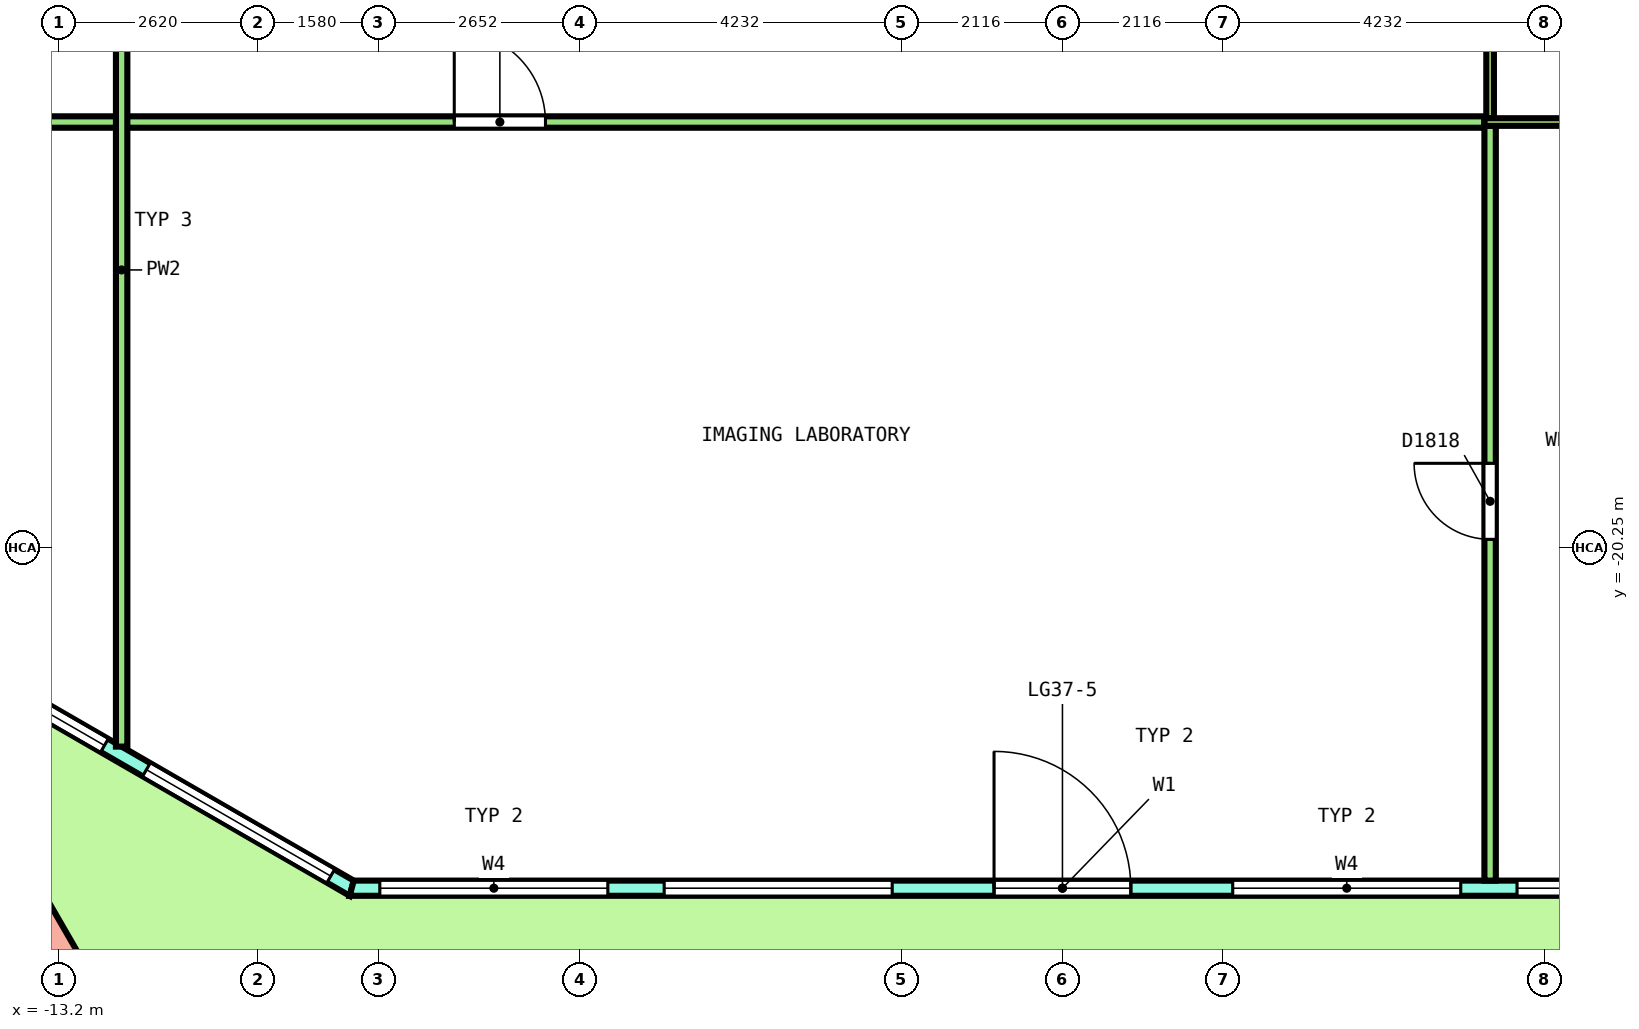
"""IFC4 building model, lengths in metres.
Left out: names, types, materials, properties, quantities, classifications, styles, units other than length and angle.
Written with IfcOpenShell. Run it as: python <this file> out.ifc"""

import sys

from ifc_helpers import new_model, si_unit, direction, frame, frame_2d, origin, origin_2d, place, context, subcontext, project, spatial, polyline, rectangle, outline, extrude, element, fill, save


model = new_model("IFC4")
c1 = context("Model", 3, precision=1e-05, world=origin(), true_north=direction((0.0, 1.0)))
c2 = subcontext(c1, "Body", "Model", "MODEL_VIEW")
j1 = project(units=[si_unit("LENGTHUNIT", "METRE"), si_unit("PLANEANGLEUNIT", "RADIAN")], contexts=[c1])
p1 = place(None, origin())
s1 = spatial("IfcSite", under=j1, at=p1, CompositionType="ELEMENT")
p2 = place(p1, origin())
s2 = spatial("IfcBuilding", under=s1, at=p2, CompositionType="ELEMENT")
p3 = place(p2, frame((0.0, 0.0, 171.6)))
s3 = spatial("IfcBuildingStorey", under=s2, at=p3, CompositionType="ELEMENT", Elevation=171.6)
p4 = place(p3, frame((-13.727, -25.436, 0.0), z_axis=(0.018133721723, -0.031387604711, 0.999342777233), x_axis=(0.86599921333, -0.499059227482, -0.031388691869)))
e1 = element("IfcColumn", 1, at=p4, inside=s3, PredefinedType="COLUMN", context=c2, shape_type="SweptSolid", body=[
    extrude(rectangle(XDim=1.2, YDim=1.2, at=origin_2d()), origin(), (0.0, 0.0, 1.0), 4.052),
])
p5 = place(p3, frame((-15.304, -21.292, 0.0), z_axis=(0.0, 0.0, 1.0), x_axis=(0.866014080581, -0.50001961185, 0.0)))
e2 = element("IfcWall", 2, at=p5, inside=s3, PredefinedType="SOLIDWALL", context=c2, shape_type="SweptSolid", body=[
    extrude(outline(polyline([(-0.027, -0.1), (1.128, -0.1), (2.283, -0.1), (3.438, -0.1), (4.592, -0.1), (5.747, -0.1), (6.902, -0.1), (6.848, 0.1), (5.711, 0.1), (4.574, 0.1), (3.438, 0.1), (2.301, 0.1), (1.164, 0.1), (0.027, 0.1), (-0.027, -0.1)])), origin(), (0.0, 0.0, 1.0), 4.1),
])
p6 = place(p5, frame((0.319, 0.0, 0.1)))
e3 = element("IfcOpeningElement", 3, at=p6, cuts=e2, PredefinedType="OPENING", context=c2, shape_type="SweptSolid", body=[
    extrude(rectangle(XDim=2.8, YDim=2.9, at=frame_2d((1.4, 1.45))), frame((0.0, 0.11, 0.0), z_axis=(0.0, -1.0, 0.0), x_axis=(1.0, 0.0, 0.0)), (0.0, 0.0, 1.0), 0.22),
])
p7 = place(p5, frame((3.756, 0.0, 0.1)))
e4 = element("IfcOpeningElement", 4, at=p7, cuts=e2, PredefinedType="OPENING", context=c2, shape_type="SweptSolid", body=[
    extrude(rectangle(XDim=2.8, YDim=2.9, at=frame_2d((1.4, 1.45))), frame((0.0, 0.11, 0.0), z_axis=(0.0, -1.0, 0.0), x_axis=(1.0, 0.0, 0.0)), (0.0, 0.0, 1.0), 0.22),
])
p8 = place(p3, frame((-9.351, -24.73, 0.0), z_axis=(0.0, 0.0, 1.0), x_axis=(1.0, 0.0, 0.0)))
e5 = element("IfcWall", 5, at=p8, inside=s3, PredefinedType="SOLIDWALL", context=c2, shape_type="SweptSolid", body=[
    extrude(outline(polyline([(-0.027, -0.1), (1.015, -0.1), (2.057, -0.1), (3.099, -0.1), (4.141, -0.1), (5.183, -0.1), (6.225, -0.1), (7.267, -0.1), (8.309, -0.1), (9.351, -0.1), (10.393, -0.1), (11.435, -0.1), (12.476, -0.1), (13.518, -0.1), (14.56, -0.1), (15.602, -0.1), (16.644, -0.1), (17.686, -0.1), (18.728, -0.1), (18.674, 0.1), (17.638, 0.1), (16.602, 0.1), (15.566, 0.1), (14.531, 0.1), (13.494, 0.1), (12.458, 0.1), (11.423, 0.1), (10.386, 0.1), (9.351, 0.1), (8.315, 0.1), (7.279, 0.1), (6.243, 0.1), (5.207, 0.1), (4.171, 0.1), (3.135, 0.1), (2.099, 0.1), (1.063, 0.1), (0.027, 0.1), (-0.027, -0.1)])), origin(), (0.0, 0.0, 1.0), 4.1),
])
p9 = place(p8, frame((0.37, 0.0, 0.1)))
e6 = element("IfcOpeningElement", 6, at=p9, cuts=e5, PredefinedType="OPENING", context=c2, shape_type="SweptSolid", body=[
    extrude(rectangle(XDim=3.0, YDim=2.9, at=frame_2d((1.5, 1.45))), frame((0.0, 0.11, 0.0), z_axis=(0.0, -1.0, 0.0), x_axis=(1.0, 0.0, 0.0)), (0.0, 0.0, 1.0), 0.22),
])
p10 = place(p8, frame((4.11, 0.0, 0.1)))
e7 = element("IfcOpeningElement", 7, at=p10, cuts=e5, PredefinedType="OPENING", context=c2, shape_type="SweptSolid", body=[
    extrude(rectangle(XDim=3.0, YDim=2.9, at=frame_2d((1.5, 1.45))), frame((0.0, 0.11, 0.0), z_axis=(0.0, -1.0, 0.0), x_axis=(1.0, 0.0, 0.0)), (0.0, 0.0, 1.0), 0.22),
])
p11 = place(p8, frame((8.451, 0.0, 0.0)))
e8 = element("IfcOpeningElement", 8, at=p11, cuts=e5, PredefinedType="OPENING", context=c2, shape_type="SweptSolid", body=[
    extrude(rectangle(XDim=1.8, YDim=2.4, at=frame_2d((0.9, 1.2))), frame((0.0, 0.11, 0.0), z_axis=(0.0, -1.0, 0.0), x_axis=(1.0, 0.0, 0.0)), (0.0, 0.0, 1.0), 0.22),
])
p12 = place(p8, frame((8.451, 0.0, 2.55)))
e9 = element("IfcOpeningElement", 9, at=p12, cuts=e5, PredefinedType="OPENING", context=c2, shape_type="SweptSolid", body=[
    extrude(rectangle(XDim=1.8, YDim=0.45, at=frame_2d((0.9, 0.225))), frame((0.0, 0.11, 0.0), z_axis=(0.0, -1.0, 0.0), x_axis=(1.0, 0.0, 0.0)), (0.0, 0.0, 1.0), 0.22),
])
p13 = place(p8, frame((11.591, 0.0, 0.1)))
e10 = element("IfcOpeningElement", 10, at=p13, cuts=e5, PredefinedType="OPENING", context=c2, shape_type="SweptSolid", body=[
    extrude(rectangle(XDim=3.0, YDim=2.9, at=frame_2d((1.5, 1.45))), frame((0.0, 0.11, 0.0), z_axis=(0.0, -1.0, 0.0), x_axis=(1.0, 0.0, 0.0)), (0.0, 0.0, 1.0), 0.22),
])
p14 = place(p8, frame((15.331, 0.0, 0.1)))
e11 = element("IfcOpeningElement", 11, at=p14, cuts=e5, PredefinedType="OPENING", context=c2, shape_type="SweptSolid", body=[
    extrude(rectangle(XDim=3.0, YDim=2.9, at=frame_2d((1.5, 1.45))), frame((0.0, 0.11, 0.0), z_axis=(0.0, -1.0, 0.0), x_axis=(1.0, 0.0, 0.0)), (0.0, 0.0, 1.0), 0.22),
])
p15 = place(p3, frame((-19.024, -14.65, 0.0), z_axis=(0.0, 0.0, 1.0), x_axis=(1.0, 0.0, 0.0)))
e12 = element("IfcWall", 12, at=p15, inside=s3, PredefinedType="PARTITIONING", context=c2, shape_type="SweptSolid", body=[
    extrude(rectangle(XDim=24.575, YDim=0.15, at=frame_2d((12.288, 0.0))), origin(), (0.0, 0.0, 1.0), 3.05),
])
p16 = place(p15, frame((2.823, 0.0, 0.0)))
e13 = element("IfcOpeningElement", 13, at=p16, cuts=e12, PredefinedType="OPENING", context=c2, shape_type="SweptSolid", body=[
    extrude(rectangle(XDim=1.0, YDim=2.1, at=frame_2d((0.5, 1.05))), frame((0.0, 0.085, 0.0), z_axis=(0.0, -1.0, 0.0), x_axis=(1.0, 0.0, 0.0)), (0.0, 0.0, 1.0), 0.17),
])
p17 = place(p15, frame((11.022, 0.0, 0.0)))
e14 = element("IfcOpeningElement", 14, at=p17, cuts=e12, PredefinedType="OPENING", context=c2, shape_type="SweptSolid", body=[
    extrude(rectangle(XDim=1.2, YDim=2.1, at=frame_2d((0.6, 1.05))), frame((0.0, 0.085, 0.0), z_axis=(0.0, -1.0, 0.0), x_axis=(1.0, 0.0, 0.0)), (0.0, 0.0, 1.0), 0.17),
])
p18 = place(p3, frame((-12.377, -22.867, 0.0), z_axis=(0.0, 0.0, 1.0), x_axis=(0.0, 1.0, 0.0)))
e15 = element("IfcWall", 15, at=p18, inside=s3, PredefinedType="PARTITIONING", context=c2, shape_type="SweptSolid", body=[
    extrude(rectangle(XDim=12.542, YDim=0.15, at=frame_2d((6.271, 0.0))), origin(), (0.0, 0.0, 1.0), 3.05),
])
p19 = place(p3, frame((5.626, -24.63, 0.0), z_axis=(0.0, 0.0, 1.0), x_axis=(0.0, 1.0, 0.0)))
e16 = element("IfcWall", 16, at=p19, inside=s3, PredefinedType="PARTITIONING", context=c2, shape_type="SweptSolid", body=[
    extrude(rectangle(XDim=9.93, YDim=0.15, at=frame_2d((4.965, 0.0))), origin(), (0.0, 0.0, 1.0), 3.05),
])
p20 = place(p19, frame((4.49, 0.0, 0.0)))
e17 = element("IfcOpeningElement", 17, at=p20, cuts=e16, PredefinedType="OPENING", context=c2, shape_type="SweptSolid", body=[
    extrude(rectangle(XDim=1.0, YDim=2.1, at=frame_2d((0.5, 1.05))), frame((0.0, 0.085, 0.0), z_axis=(0.0, -1.0, 0.0), x_axis=(1.0, 0.0, 0.0)), (0.0, 0.0, 1.0), 0.17),
])
p21 = place(p3, frame((5.626, -14.6, 0.0), z_axis=(0.0, 0.0, 1.0), x_axis=(0.0, 1.0, 0.0)))
e18 = element("IfcWall", 18, at=p21, inside=s3, PredefinedType="PARTITIONING", context=c2, shape_type="SweptSolid", body=[
    extrude(rectangle(XDim=4.275, YDim=0.1, at=frame_2d((2.138, 0.0))), origin(), (0.0, 0.0, 1.0), 3.05),
])
p22 = place(p3, frame((5.552, -14.65, 0.0), z_axis=(0.0, 0.0, 1.0), x_axis=(1.0, 0.0, 0.0)))
e19 = element("IfcWall", 19, at=p22, inside=s3, PredefinedType="PARTITIONING", context=c2, shape_type="SweptSolid", body=[
    extrude(rectangle(XDim=3.776, YDim=0.1, at=frame_2d((1.888, 0.0))), origin(), (0.0, 0.0, 1.0), 3.05),
])
p23 = place(p6, origin())
e20 = element("IfcWindow", 20, at=p23, inside=s3, PartitioningType="SINGLE_PANEL", PredefinedType="WINDOW", context=c2, shape_type="SweptSolid", body=[
    extrude(rectangle(XDim=2.8, YDim=2.9, at=frame_2d((1.4, 1.45))), frame((0.0, 0.03, 0.0), z_axis=(0.0, -1.0, 0.0), x_axis=(1.0, 0.0, 0.0)), (0.0, 0.0, 1.0), 0.06),
])
fill(e3, e20)
p24 = place(p7, origin())
e21 = element("IfcWindow", 21, at=p24, inside=s3, PartitioningType="SINGLE_PANEL", PredefinedType="WINDOW", context=c2, shape_type="SweptSolid", body=[
    extrude(rectangle(XDim=2.8, YDim=2.9, at=frame_2d((1.4, 1.45))), frame((0.0, 0.03, 0.0), z_axis=(0.0, -1.0, 0.0), x_axis=(1.0, 0.0, 0.0)), (0.0, 0.0, 1.0), 0.06),
])
fill(e4, e21)
p25 = place(p9, origin())
e22 = element("IfcWindow", 22, at=p25, inside=s3, PartitioningType="SINGLE_PANEL", PredefinedType="WINDOW", context=c2, shape_type="SweptSolid", body=[
    extrude(rectangle(XDim=3.0, YDim=2.9, at=frame_2d((1.5, 1.45))), frame((0.0, 0.03, 0.0), z_axis=(0.0, -1.0, 0.0), x_axis=(1.0, 0.0, 0.0)), (0.0, 0.0, 1.0), 0.06),
])
fill(e6, e22)
p26 = place(p10, origin())
e23 = element("IfcWindow", 23, at=p26, inside=s3, PartitioningType="SINGLE_PANEL", PredefinedType="WINDOW", context=c2, shape_type="SweptSolid", body=[
    extrude(rectangle(XDim=3.0, YDim=2.9, at=frame_2d((1.5, 1.45))), frame((0.0, 0.03, 0.0), z_axis=(0.0, -1.0, 0.0), x_axis=(1.0, 0.0, 0.0)), (0.0, 0.0, 1.0), 0.06),
])
fill(e7, e23)
p27 = place(p11, origin())
e24 = element("IfcDoor", 24, at=p27, inside=s3, OperationType="DOUBLE_DOOR_SINGLE_SWING", PredefinedType="DOOR", context=c2, shape_type="SweptSolid", body=[
    extrude(rectangle(XDim=1.8, YDim=2.4, at=frame_2d((0.9, 1.2))), frame((0.0, 0.025, 0.0), z_axis=(0.0, -1.0, 0.0), x_axis=(1.0, 0.0, 0.0)), (0.0, 0.0, 1.0), 0.05),
])
fill(e8, e24)
p28 = place(p12, origin())
e25 = element("IfcWindow", 25, at=p28, inside=s3, PartitioningType="SINGLE_PANEL", PredefinedType="WINDOW", context=c2, shape_type="SweptSolid", body=[
    extrude(rectangle(XDim=1.8, YDim=0.45, at=frame_2d((0.9, 0.225))), frame((0.0, 0.03, 0.0), z_axis=(0.0, -1.0, 0.0), x_axis=(1.0, 0.0, 0.0)), (0.0, 0.0, 1.0), 0.06),
])
fill(e9, e25)
p29 = place(p13, origin())
e26 = element("IfcWindow", 26, at=p29, inside=s3, PartitioningType="SINGLE_PANEL", PredefinedType="WINDOW", context=c2, shape_type="SweptSolid", body=[
    extrude(rectangle(XDim=3.0, YDim=2.9, at=frame_2d((1.5, 1.45))), frame((0.0, 0.03, 0.0), z_axis=(0.0, -1.0, 0.0), x_axis=(1.0, 0.0, 0.0)), (0.0, 0.0, 1.0), 0.06),
])
fill(e10, e26)
p30 = place(p14, origin())
e27 = element("IfcWindow", 27, at=p30, inside=s3, PartitioningType="SINGLE_PANEL", PredefinedType="WINDOW", context=c2, shape_type="SweptSolid", body=[
    extrude(rectangle(XDim=3.0, YDim=2.9, at=frame_2d((1.5, 1.45))), frame((0.0, 0.03, 0.0), z_axis=(0.0, -1.0, 0.0), x_axis=(1.0, 0.0, 0.0)), (0.0, 0.0, 1.0), 0.06),
])
fill(e11, e27)
p31 = place(p17, origin())
e28 = element("IfcDoor", 28, at=p31, inside=s3, OperationType="DOUBLE_DOOR_SINGLE_SWING", PredefinedType="DOOR", context=c2, shape_type="SweptSolid", body=[
    extrude(rectangle(XDim=1.2, YDim=2.1, at=frame_2d((0.6, 1.05))), frame((0.0, 0.025, 0.0), z_axis=(0.0, -1.0, 0.0), x_axis=(1.0, 0.0, 0.0)), (0.0, 0.0, 1.0), 0.05),
])
fill(e14, e28)
p32 = place(p20, origin())
e29 = element("IfcDoor", 29, at=p32, inside=s3, OperationType="SINGLE_SWING_RIGHT", PredefinedType="DOOR", context=c2, shape_type="SweptSolid", body=[
    extrude(rectangle(XDim=1.0, YDim=2.1, at=frame_2d((0.5, 1.05))), frame((0.0, 0.025, 0.0), z_axis=(0.0, -1.0, 0.0), x_axis=(1.0, 0.0, 0.0)), (0.0, 0.0, 1.0), 0.05),
])
fill(e17, e29)
save(model, sys.argv[1])
